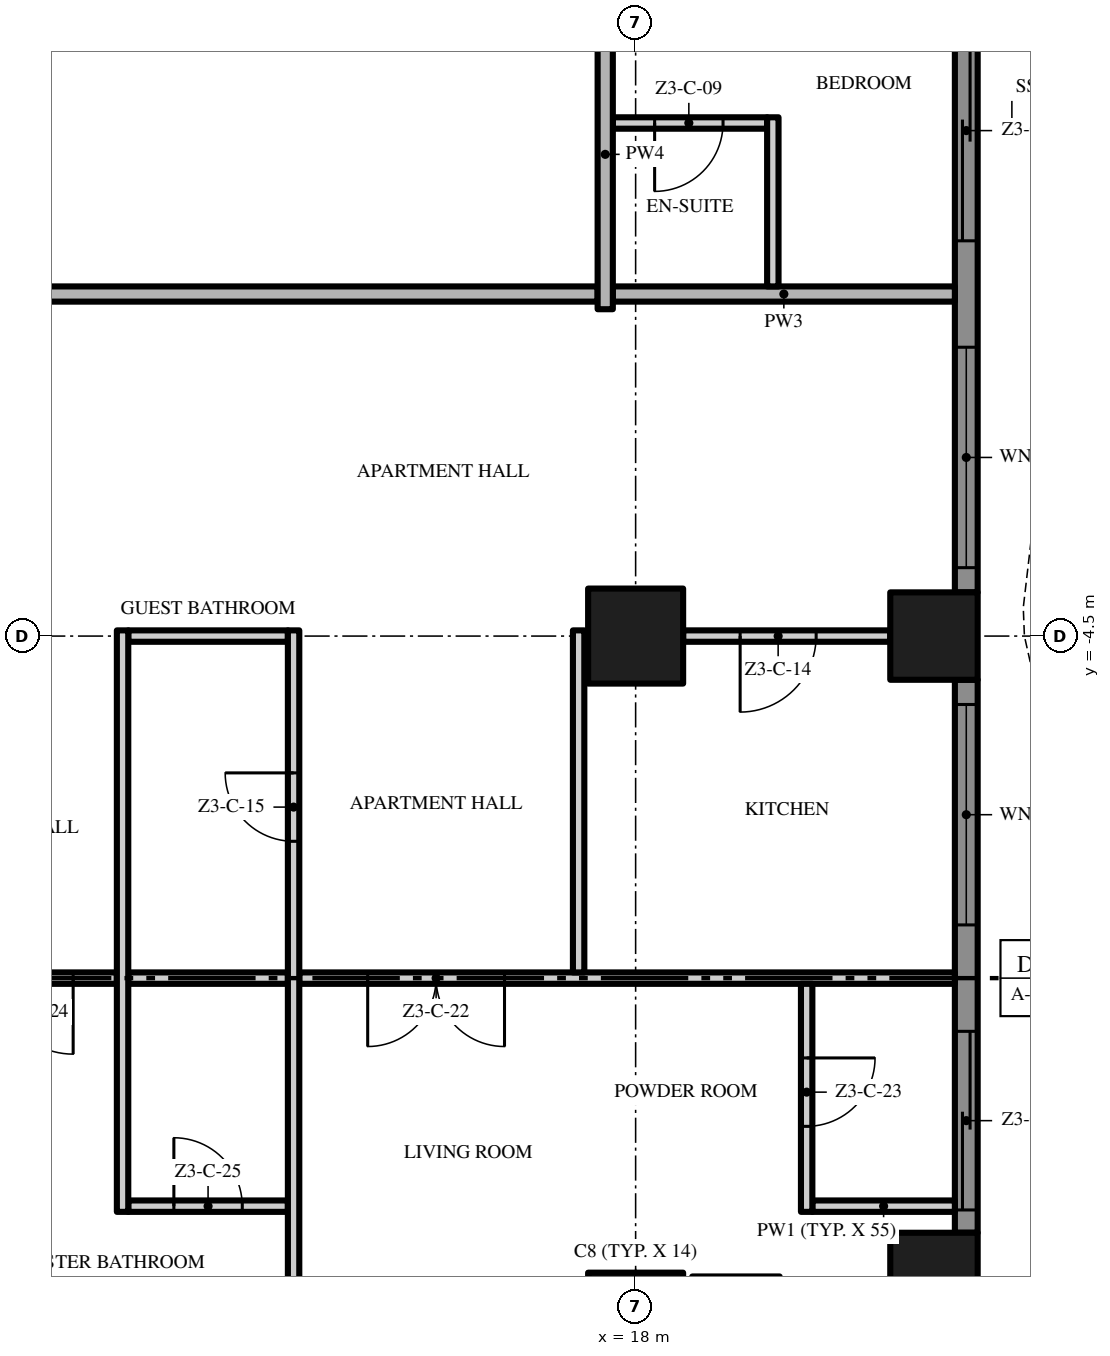
"""IFC4 building model, lengths in metres.
Left out: names, types, materials, properties, quantities, classifications, styles, units other than length and angle.
Written with IfcOpenShell. Run it as: python <this file> out.ifc"""

import sys

from ifc_helpers import new_model, si_unit, direction, frame, frame_2d, origin, origin_2d, place, context, subcontext, project, spatial, polyline, rectangle, outline, extrude, element, fill, save


model = new_model("IFC4")
c1 = context("Model", 3, precision=1e-05, world=origin(), true_north=direction((0.0, 1.0)))
c2 = subcontext(c1, "Body", "Model", "MODEL_VIEW")
j1 = project(units=[si_unit("LENGTHUNIT", "METRE"), si_unit("PLANEANGLEUNIT", "RADIAN")], contexts=[c1])
p1 = place(None, origin())
s1 = spatial("IfcSite", under=j1, at=p1, CompositionType="ELEMENT")
p2 = place(p1, origin())
s2 = spatial("IfcBuilding", under=s1, at=p2, CompositionType="ELEMENT")
p3 = place(p2, frame((0.0, 0.0, 147.8)))
s3 = spatial("IfcBuildingStorey", under=s2, at=p3, CompositionType="ELEMENT", Elevation=147.8)
for number, where, z_axis, x_axis in (
    (1, (18.0, -13.5, 0.0), (0.0, 0.0, 1.0), (1.0, 0.0, 0.0)),
    (2, (18.0, -4.5, 0.0), (0.0, 0.0, 1.0), (1.0, 0.0, 0.0)),
):
    element("IfcColumn", number, at=place(p3, frame(where, z_axis=z_axis, x_axis=x_axis)), inside=s3, PredefinedType="COLUMN", context=c2, shape_type="SweptSolid", body=[
        extrude(rectangle(XDim=1.25, YDim=1.25, at=origin_2d()), origin(), (0.0, 0.0, 1.0), 3.5),
    ])
for number, where, z_axis, x_axis in (
    (3, (21.925, -12.925, 0.0), (0.0, 0.0, 1.0), (1.0, 0.0, 0.0)),
    (4, (21.925, -4.5, 0.0), (0.0, 0.0, 1.0), (1.0, 0.0, 0.0)),
):
    element("IfcColumn", number, at=place(p3, frame(where, z_axis=z_axis, x_axis=x_axis)), inside=s3, PredefinedType="COLUMN", context=c2, shape_type="SweptSolid", body=[
        extrude(rectangle(XDim=1.15, YDim=1.15, at=origin_2d()), origin(), (0.0, 0.0, 1.0), 3.5),
    ])
p4 = place(p3, frame((22.35, -5.075, 0.0), z_axis=(0.0, 0.0, 1.0), x_axis=(0.0, -1.0, 0.0)))
e5 = element("IfcWall", 5, at=p4, inside=s3, PredefinedType="SOLIDWALL", context=c2, shape_type="SweptSolid", body=[
    extrude(rectangle(XDim=7.275, YDim=0.3, at=frame_2d((3.638, 0.0))), origin(), (0.0, 0.0, 1.0), 3.5),
])
p5 = place(p4, frame((4.625, 0.0, 0.0)))
e6 = element("IfcOpeningElement", 6, at=p5, cuts=e5, PredefinedType="OPENING", context=c2, shape_type="SweptSolid", body=[
    extrude(rectangle(XDim=2.35, YDim=2.4, at=frame_2d((1.175, 1.2))), frame((0.0, 0.16, 0.0), z_axis=(0.0, -1.0, 0.0), x_axis=(1.0, 0.0, 0.0)), (0.0, 0.0, 1.0), 0.32),
])
p6 = place(p4, frame((0.325, 0.0, 0.45)))
e7 = element("IfcOpeningElement", 7, at=p6, cuts=e5, PredefinedType="OPENING", context=c2, shape_type="SweptSolid", body=[
    extrude(rectangle(XDim=2.9, YDim=2.65, at=frame_2d((1.45, 1.325))), frame((0.0, 0.16, 0.0), z_axis=(0.0, -1.0, 0.0), x_axis=(1.0, 0.0, 0.0)), (0.0, 0.0, 1.0), 0.32),
])
p7 = place(p3, frame((22.35, 3.925, 0.0), z_axis=(0.0, 0.0, 1.0), x_axis=(0.0, -1.0, 0.0)))
e8 = element("IfcWall", 8, at=p7, inside=s3, PredefinedType="SOLIDWALL", context=c2, shape_type="SweptSolid", body=[
    extrude(rectangle(XDim=7.85, YDim=0.3, at=frame_2d((3.925, 0.0))), origin(), (0.0, 0.0, 1.0), 3.5),
])
p8 = place(p7, frame((4.625, 0.0, 0.45)))
e9 = element("IfcOpeningElement", 9, at=p8, cuts=e8, PredefinedType="OPENING", context=c2, shape_type="SweptSolid", body=[
    extrude(rectangle(XDim=2.9, YDim=2.65, at=frame_2d((1.45, 1.325))), frame((0.0, 0.16, 0.0), z_axis=(0.0, -1.0, 0.0), x_axis=(1.0, 0.0, 0.0)), (0.0, 0.0, 1.0), 0.32),
])
p9 = place(p7, frame((0.325, 0.0, 0.0)))
e10 = element("IfcOpeningElement", 10, at=p9, cuts=e8, PredefinedType="OPENING", context=c2, shape_type="SweptSolid", body=[
    extrude(rectangle(XDim=2.9, YDim=2.4, at=frame_2d((1.45, 1.2))), frame((0.0, 0.16, 0.0), z_axis=(0.0, -1.0, 0.0), x_axis=(1.0, 0.0, 0.0)), (0.0, 0.0, 1.0), 0.32),
])
p10 = place(p3, origin())
e11 = element("IfcWall", 11, at=p10, inside=s3, PredefinedType="USERDEFINED", context=c2, shape_type="SweptSolid", body=[
    extrude(outline(polyline([(25.149, -13.5), (25.485, -12.0), (25.5, -11.625), (25.369, -10.5), (24.845, -9.0), (24.112, -7.5), (23.451, -6.0), (23.115, -4.5), (23.1, -4.125), (23.231, -3.0), (23.755, -1.5), (24.488, 0.0), (25.149, 1.5), (25.485, 3.0), (25.5, 3.375), (25.369, 4.5), (24.845, 6.0), (24.112, 7.5), (23.451, 9.0), (23.115, 10.5), (23.1, 10.875), (23.231, 12.0), (23.755, 13.5), (24.488, 15.0), (25.149, 16.5), (25.485, 18.0), (25.241, 18.055), (24.91, 16.579), (24.261, 15.105), (23.524, 13.596), (22.986, 12.056), (22.849, 10.885), (22.866, 10.467), (23.213, 8.921), (23.885, 7.395), (24.614, 5.904), (25.124, 4.444), (25.249, 3.365), (25.236, 3.033), (24.91, 1.579), (24.261, 0.105), (23.524, -1.404), (22.986, -2.944), (22.849, -4.115), (22.866, -4.533), (23.213, -6.079), (23.885, -7.605), (24.614, -9.096), (25.124, -10.556), (25.249, -11.635), (25.236, -11.967), (24.905, -13.445), (25.149, -13.5)])), origin(), (0.0, 0.0, 1.0), 0.9),
])
p11 = place(p3, frame((11.325, -12.0, 0.0), z_axis=(0.0, 0.0, 1.0), x_axis=(1.0, 0.0, 0.0)))
e12 = element("IfcWall", 12, at=p11, inside=s3, PredefinedType="PARTITIONING", context=c2, shape_type="SweptSolid", body=[
    extrude(rectangle(XDim=2.1, YDim=0.15, at=frame_2d((1.05, 0.0))), origin(), (0.0, 0.0, 1.0), 3.5),
])
p12 = place(p11, frame((0.6, 0.0, 0.0)))
e13 = element("IfcOpeningElement", 13, at=p12, cuts=e12, PredefinedType="OPENING", context=c2, shape_type="SweptSolid", body=[
    extrude(rectangle(XDim=0.9, YDim=2.1, at=frame_2d((0.45, 1.05))), frame((0.0, 0.085, 0.0), z_axis=(0.0, -1.0, 0.0), x_axis=(1.0, 0.0, 0.0)), (0.0, 0.0, 1.0), 0.17),
])
p13 = place(p3, frame((20.325, -12.0, 0.0), z_axis=(0.0, 0.0, 1.0), x_axis=(1.0, 0.0, 0.0)))
e14 = element("IfcWall", 14, at=p13, inside=s3, PredefinedType="PARTITIONING", context=c2, shape_type="SweptSolid", body=[
    extrude(rectangle(XDim=1.875, YDim=0.15, at=frame_2d((0.938, 0.0))), origin(), (0.0, 0.0, 1.0), 3.5),
])
p14 = place(p3, frame((11.175, -9.0, 0.0), z_axis=(0.0, 0.0, 1.0), x_axis=(-1.0, 0.0, 0.0)))
e15 = element("IfcWall", 15, at=p14, inside=s3, PredefinedType="PARTITIONING", context=c2, shape_type="SweptSolid", body=[
    extrude(rectangle(XDim=4.35, YDim=0.15, at=frame_2d((2.175, 0.0))), origin(), (0.0, 0.0, 1.0), 3.5),
])
p15 = place(p14, frame((0.575, 0.0, 0.0)))
e16 = element("IfcOpeningElement", 16, at=p15, cuts=e15, PredefinedType="OPENING", context=c2, shape_type="SweptSolid", body=[
    extrude(rectangle(XDim=1.0, YDim=2.4, at=frame_2d((0.5, 1.2))), frame((0.0, 0.085, 0.0), z_axis=(0.0, -1.0, 0.0), x_axis=(1.0, 0.0, 0.0)), (0.0, 0.0, 1.0), 0.17),
])
p16 = place(p14, frame((2.8, 0.0, 0.0)))
e17 = element("IfcOpeningElement", 17, at=p16, cuts=e15, PredefinedType="OPENING", context=c2, shape_type="SweptSolid", body=[
    extrude(rectangle(XDim=1.0, YDim=2.4, at=frame_2d((0.5, 1.2))), frame((0.0, 0.085, 0.0), z_axis=(0.0, -1.0, 0.0), x_axis=(1.0, 0.0, 0.0)), (0.0, 0.0, 1.0), 0.17),
])
p17 = place(p3, frame((11.325, -9.0, 0.0), z_axis=(0.0, 0.0, 1.0), x_axis=(1.0, 0.0, 0.0)))
e18 = element("IfcWall", 18, at=p17, inside=s3, PredefinedType="PARTITIONING", context=c2, shape_type="SweptSolid", body=[
    extrude(rectangle(XDim=2.1, YDim=0.15, at=frame_2d((1.05, 0.0))), origin(), (0.0, 0.0, 1.0), 3.5),
])
p18 = place(p3, frame((22.2, -9.0, 0.0), z_axis=(0.0, 0.0, 1.0), x_axis=(-1.0, 0.0, 0.0)))
e19 = element("IfcWall", 19, at=p18, inside=s3, PredefinedType="PARTITIONING", context=c2, shape_type="SweptSolid", body=[
    extrude(rectangle(XDim=8.625, YDim=0.15, at=frame_2d((4.312, 0.0))), origin(), (0.0, 0.0, 1.0), 3.5),
])
p19 = place(p18, frame((5.925, 0.0, 0.0)))
e20 = element("IfcOpeningElement", 20, at=p19, cuts=e19, PredefinedType="OPENING", context=c2, shape_type="SweptSolid", body=[
    extrude(rectangle(XDim=1.8, YDim=2.4, at=frame_2d((0.9, 1.2))), frame((0.0, 0.085, 0.0), z_axis=(0.0, -1.0, 0.0), x_axis=(1.0, 0.0, 0.0)), (0.0, 0.0, 1.0), 0.17),
])
p20 = place(p3, frame((11.325, -4.5, 0.0), z_axis=(0.0, 0.0, 1.0), x_axis=(1.0, 0.0, 0.0)))
e21 = element("IfcWall", 21, at=p20, inside=s3, PredefinedType="PARTITIONING", context=c2, shape_type="SweptSolid", body=[
    extrude(rectangle(XDim=2.1, YDim=0.15, at=frame_2d((1.05, 0.0))), origin(), (0.0, 0.0, 1.0), 3.5),
])
p21 = place(p3, frame((21.35, -4.5, 0.0), z_axis=(0.0, 0.0, 1.0), x_axis=(-1.0, 0.0, 0.0)))
e22 = element("IfcWall", 22, at=p21, inside=s3, PredefinedType="PARTITIONING", context=c2, shape_type="SweptSolid", body=[
    extrude(rectangle(XDim=2.725, YDim=0.15, at=frame_2d((1.363, 0.0))), origin(), (0.0, 0.0, 1.0), 3.5),
])
p22 = place(p21, frame((0.975, 0.0, 0.0)))
e23 = element("IfcOpeningElement", 23, at=p22, cuts=e22, PredefinedType="OPENING", context=c2, shape_type="SweptSolid", body=[
    extrude(rectangle(XDim=1.0, YDim=2.4, at=frame_2d((0.5, 1.2))), frame((0.0, 0.085, 0.0), z_axis=(0.0, -1.0, 0.0), x_axis=(1.0, 0.0, 0.0)), (0.0, 0.0, 1.0), 0.17),
])
p23 = place(p3, frame((17.5, 0.0, 0.0), z_axis=(0.0, 0.0, 1.0), x_axis=(-1.0, 0.0, 0.0)))
e24 = element("IfcWall", 24, at=p23, inside=s3, PredefinedType="PARTITIONING", context=c2, shape_type="SweptSolid", body=[
    extrude(rectangle(XDim=35.0, YDim=0.2, at=frame_2d((17.5, 0.0))), origin(), (0.0, 0.0, 1.0), 3.5),
])
p24 = place(p23, frame((16.75, 0.0, 0.0)))
e25 = element("IfcOpeningElement", 25, at=p24, cuts=e24, PredefinedType="OPENING", context=c2, shape_type="SweptSolid", body=[
    extrude(rectangle(XDim=1.5, YDim=2.4, at=frame_2d((0.75, 1.2))), frame((0.0, 0.11, 0.0), z_axis=(0.0, -1.0, 0.0), x_axis=(1.0, 0.0, 0.0)), (0.0, 0.0, 1.0), 0.22),
])
p25 = place(p3, frame((17.7, 0.0, 0.0), z_axis=(0.0, 0.0, 1.0), x_axis=(1.0, 0.0, 0.0)))
e26 = element("IfcWall", 26, at=p25, inside=s3, PredefinedType="PARTITIONING", context=c2, shape_type="SweptSolid", body=[
    extrude(rectangle(XDim=4.5, YDim=0.2, at=frame_2d((2.25, 0.0))), origin(), (0.0, 0.0, 1.0), 3.5),
])
p26 = place(p3, frame((19.73, 2.25, 0.0), z_axis=(0.0, 0.0, 1.0), x_axis=(-1.0, 0.0, 0.0)))
e27 = element("IfcWall", 27, at=p26, inside=s3, PredefinedType="PARTITIONING", context=c2, shape_type="SweptSolid", body=[
    extrude(rectangle(XDim=2.03, YDim=0.15, at=frame_2d((1.015, 0.0))), origin(), (0.0, 0.0, 1.0), 3.5),
])
p27 = place(p26, frame((0.58, 0.0, 0.0)))
e28 = element("IfcOpeningElement", 28, at=p27, cuts=e27, PredefinedType="OPENING", context=c2, shape_type="SweptSolid", body=[
    extrude(rectangle(XDim=0.9, YDim=2.1, at=frame_2d((0.45, 1.05))), frame((0.0, 0.085, 0.0), z_axis=(0.0, -1.0, 0.0), x_axis=(1.0, 0.0, 0.0)), (0.0, 0.0, 1.0), 0.17),
])
p28 = place(p3, frame((11.25, -12.075, 0.0), z_axis=(0.0, 0.0, 1.0), x_axis=(0.0, 1.0, 0.0)))
e29 = element("IfcWall", 29, at=p28, inside=s3, PredefinedType="PARTITIONING", context=c2, shape_type="SweptSolid", body=[
    extrude(rectangle(XDim=7.65, YDim=0.15, at=frame_2d((3.825, 0.0))), origin(), (0.0, 0.0, 1.0), 3.5),
])
p29 = place(p3, frame((13.5, -17.7, 0.0), z_axis=(0.0, 0.0, 1.0), x_axis=(0.0, 1.0, 0.0)))
e30 = element("IfcWall", 30, at=p29, inside=s3, PredefinedType="PARTITIONING", context=c2, shape_type="SweptSolid", body=[
    extrude(rectangle(XDim=13.275, YDim=0.15, at=frame_2d((6.638, 0.0))), origin(), (0.0, 0.0, 1.0), 3.5),
])
p30 = place(p29, frame((10.5, 0.0, 0.0)))
e31 = element("IfcOpeningElement", 31, at=p30, cuts=e30, PredefinedType="OPENING", context=c2, shape_type="SweptSolid", body=[
    extrude(rectangle(XDim=0.9, YDim=2.1, at=frame_2d((0.45, 1.05))), frame((0.0, 0.085, 0.0), z_axis=(0.0, -1.0, 0.0), x_axis=(1.0, 0.0, 0.0)), (0.0, 0.0, 1.0), 0.17),
])
p31 = place(p3, frame((17.25, -8.925, 0.0), z_axis=(0.0, 0.0, 1.0), x_axis=(0.0, 1.0, 0.0)))
e32 = element("IfcWall", 32, at=p31, inside=s3, PredefinedType="PARTITIONING", context=c2, shape_type="SweptSolid", body=[
    extrude(rectangle(XDim=4.5, YDim=0.15, at=frame_2d((2.25, 0.0))), origin(), (0.0, 0.0, 1.0), 3.5),
])
p32 = place(p3, frame((17.6, -0.2, 0.0), z_axis=(0.0, 0.0, 1.0), x_axis=(0.0, 1.0, 0.0)))
e33 = element("IfcWall", 33, at=p32, inside=s3, PredefinedType="PARTITIONING", context=c2, shape_type="SweptSolid", body=[
    extrude(rectangle(XDim=4.075, YDim=0.2, at=frame_2d((2.038, 0.0))), origin(), (0.0, 0.0, 1.0), 3.5),
])
p33 = place(p3, frame((19.805, 0.1, 0.0), z_axis=(0.0, 0.0, 1.0), x_axis=(0.0, 1.0, 0.0)))
e34 = element("IfcWall", 34, at=p33, inside=s3, PredefinedType="PARTITIONING", context=c2, shape_type="SweptSolid", body=[
    extrude(rectangle(XDim=2.225, YDim=0.15, at=frame_2d((1.113, 0.0))), origin(), (0.0, 0.0, 1.0), 3.5),
])
p34 = place(p3, frame((20.25, -9.075, 0.0), z_axis=(0.0, 0.0, 1.0), x_axis=(0.0, -1.0, 0.0)))
e35 = element("IfcWall", 35, at=p34, inside=s3, PredefinedType="PARTITIONING", context=c2, shape_type="SweptSolid", body=[
    extrude(rectangle(XDim=3.0, YDim=0.15, at=frame_2d((1.5, 0.0))), origin(), (0.0, 0.0, 1.0), 3.5),
])
p35 = place(p34, frame((0.975, 0.0, 0.0)))
e36 = element("IfcOpeningElement", 36, at=p35, cuts=e35, PredefinedType="OPENING", context=c2, shape_type="SweptSolid", body=[
    extrude(rectangle(XDim=0.9, YDim=2.1, at=frame_2d((0.45, 1.05))), frame((0.0, 0.085, 0.0), z_axis=(0.0, -1.0, 0.0), x_axis=(1.0, 0.0, 0.0)), (0.0, 0.0, 1.0), 0.17),
])
p36 = place(p5, origin())
e37 = element("IfcDoor", 37, at=p36, inside=s3, OperationType="SINGLE_SWING_LEFT", PredefinedType="DOOR", context=c2, shape_type="SweptSolid", body=[
    extrude(rectangle(XDim=2.35, YDim=2.4, at=frame_2d((1.175, 1.2))), frame((0.0, 0.025, 0.0), z_axis=(0.0, -1.0, 0.0), x_axis=(1.0, 0.0, 0.0)), (0.0, 0.0, 1.0), 0.05),
])
fill(e6, e37)
p37 = place(p6, origin())
e38 = element("IfcWindow", 38, at=p37, inside=s3, PartitioningType="SINGLE_PANEL", PredefinedType="WINDOW", context=c2, shape_type="SweptSolid", body=[
    extrude(rectangle(XDim=2.9, YDim=2.65, at=frame_2d((1.45, 1.325))), frame((0.0, 0.03, 0.0), z_axis=(0.0, -1.0, 0.0), x_axis=(1.0, 0.0, 0.0)), (0.0, 0.0, 1.0), 0.06),
])
fill(e7, e38)
p38 = place(p8, origin())
e39 = element("IfcWindow", 39, at=p38, inside=s3, PartitioningType="SINGLE_PANEL", PredefinedType="WINDOW", context=c2, shape_type="SweptSolid", body=[
    extrude(rectangle(XDim=2.9, YDim=2.65, at=frame_2d((1.45, 1.325))), frame((0.0, 0.03, 0.0), z_axis=(0.0, -1.0, 0.0), x_axis=(1.0, 0.0, 0.0)), (0.0, 0.0, 1.0), 0.06),
])
fill(e9, e39)
p39 = place(p9, origin())
e40 = element("IfcDoor", 40, at=p39, inside=s3, OperationType="SINGLE_SWING_LEFT", PredefinedType="DOOR", context=c2, shape_type="SweptSolid", body=[
    extrude(rectangle(XDim=2.9, YDim=2.4, at=frame_2d((1.45, 1.2))), frame((0.0, 0.025, 0.0), z_axis=(0.0, -1.0, 0.0), x_axis=(1.0, 0.0, 0.0)), (0.0, 0.0, 1.0), 0.05),
])
fill(e10, e40)
p40 = place(p27, origin())
e41 = element("IfcDoor", 41, at=p40, inside=s3, OperationType="SINGLE_SWING_RIGHT", PredefinedType="DOOR", context=c2, shape_type="SweptSolid", body=[
    extrude(rectangle(XDim=0.9, YDim=2.1, at=frame_2d((0.45, 1.05))), frame((0.0, 0.025, 0.0), z_axis=(0.0, -1.0, 0.0), x_axis=(1.0, 0.0, 0.0)), (0.0, 0.0, 1.0), 0.05),
])
fill(e28, e41)
p41 = place(p22, origin())
e42 = element("IfcDoor", 42, at=p41, inside=s3, OperationType="SINGLE_SWING_RIGHT", PredefinedType="DOOR", context=c2, shape_type="SweptSolid", body=[
    extrude(rectangle(XDim=1.0, YDim=2.4, at=frame_2d((0.5, 1.2))), frame((0.0, 0.025, 0.0), z_axis=(0.0, -1.0, 0.0), x_axis=(1.0, 0.0, 0.0)), (0.0, 0.0, 1.0), 0.05),
])
fill(e23, e42)
p42 = place(p30, origin())
e43 = element("IfcDoor", 43, at=p42, inside=s3, OperationType="SINGLE_SWING_RIGHT", PredefinedType="DOOR", context=c2, shape_type="SweptSolid", body=[
    extrude(rectangle(XDim=0.9, YDim=2.1, at=frame_2d((0.45, 1.05))), frame((0.0, 0.025, 0.0), z_axis=(0.0, -1.0, 0.0), x_axis=(1.0, 0.0, 0.0)), (0.0, 0.0, 1.0), 0.05),
])
fill(e31, e43)
p43 = place(p19, origin())
e44 = element("IfcDoor", 44, at=p43, inside=s3, OperationType="DOUBLE_DOOR_SINGLE_SWING", PredefinedType="DOOR", context=c2, shape_type="SweptSolid", body=[
    extrude(rectangle(XDim=1.8, YDim=2.4, at=frame_2d((0.9, 1.2))), frame((0.0, 0.025, 0.0), z_axis=(0.0, -1.0, 0.0), x_axis=(1.0, 0.0, 0.0)), (0.0, 0.0, 1.0), 0.05),
])
fill(e20, e44)
p44 = place(p35, origin())
e45 = element("IfcDoor", 45, at=p44, inside=s3, OperationType="SINGLE_SWING_LEFT", PredefinedType="DOOR", context=c2, shape_type="SweptSolid", body=[
    extrude(rectangle(XDim=0.9, YDim=2.1, at=frame_2d((0.45, 1.05))), frame((0.0, 0.025, 0.0), z_axis=(0.0, -1.0, 0.0), x_axis=(1.0, 0.0, 0.0)), (0.0, 0.0, 1.0), 0.05),
])
fill(e36, e45)
p45 = place(p15, origin())
e46 = element("IfcDoor", 46, at=p45, inside=s3, OperationType="SINGLE_SWING_LEFT", PredefinedType="DOOR", context=c2, shape_type="SweptSolid", body=[
    extrude(rectangle(XDim=1.0, YDim=2.4, at=frame_2d((0.5, 1.2))), frame((0.0, 0.025, 0.0), z_axis=(0.0, -1.0, 0.0), x_axis=(1.0, 0.0, 0.0)), (0.0, 0.0, 1.0), 0.05),
])
fill(e16, e46)
p46 = place(p12, origin())
e47 = element("IfcDoor", 47, at=p46, inside=s3, OperationType="SINGLE_SWING_LEFT", PredefinedType="DOOR", context=c2, shape_type="SweptSolid", body=[
    extrude(rectangle(XDim=0.9, YDim=2.1, at=frame_2d((0.45, 1.05))), frame((0.0, 0.025, 0.0), z_axis=(0.0, -1.0, 0.0), x_axis=(1.0, 0.0, 0.0)), (0.0, 0.0, 1.0), 0.05),
])
fill(e13, e47)
save(model, sys.argv[1])
